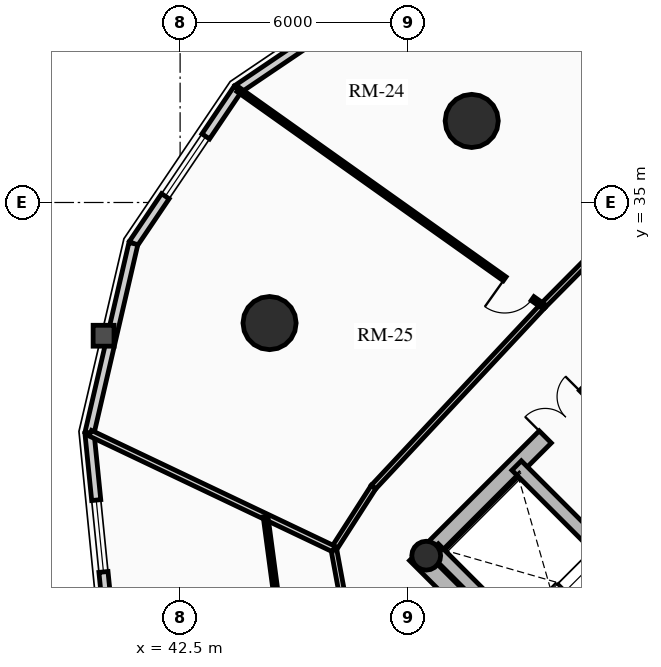
"""IFC4 building model, lengths in metres.
Left out: names, types, materials, properties, quantities, classifications, styles, units other than length and angle.
Written with IfcOpenShell. Run it as: python <this file> out.ifc"""

import sys

from ifc_helpers import new_model, si_unit, direction, frame, frame_2d, origin, origin_2d, place, context, subcontext, project, spatial, rectangle, circle, hollow_circle, extrude, source, transform, mapped, element, fill, save


model = new_model("IFC4")
c1 = context("Model", 3, precision=1e-05, world=origin(), true_north=direction((0.0, 1.0)))
c2 = subcontext(c1, "Body", "Model", "MODEL_VIEW")
j1 = project(units=[si_unit("LENGTHUNIT", "METRE"), si_unit("PLANEANGLEUNIT", "RADIAN")], contexts=[c1])
p1 = place(None, origin())
s1 = spatial("IfcSite", under=j1, at=p1, CompositionType="ELEMENT")
p2 = place(p1, origin())
s2 = spatial("IfcBuilding", under=s1, at=p2, CompositionType="ELEMENT")
p3 = place(p2, frame((0.0, 0.0, 113.8)))
s3 = spatial("IfcBuildingStorey", under=s2, at=p3, CompositionType="ELEMENT", Elevation=113.8)
p4 = place(p3, frame((58.737, 15.697, 0.0), z_axis=(0.0, 0.0, 1.0), x_axis=(-0.707106781187, 0.707106781187, 0.0)))
e1 = element("IfcWall", 1, at=p4, inside=s3, PredefinedType="SHEAR", context=c2, shape_type="SweptSolid", body=[
    extrude(rectangle(XDim=14.2, YDim=0.45, at=frame_2d((7.1, 0.0))), origin(), (0.0, 0.0, 1.0), 2.91),
])
p5 = place(p3, frame((48.856, 25.578, 0.0), z_axis=(0.0, 0.0, 1.0), x_axis=(0.707106781187, 0.707106781187, 0.0)))
e2 = element("IfcWall", 2, at=p5, inside=s3, PredefinedType="SHEAR", context=c2, shape_type="SweptSolid", body=[
    extrude(rectangle(XDim=10.7, YDim=0.45, at=frame_2d((5.35, 0.0))), origin(), (0.0, 0.0, 1.0), 2.91),
])
m1 = source(origin(), c2, "Body", "SweptSolid", [
    extrude(rectangle(XDim=1.5, YDim=2.02, at=frame_2d((0.75, 1.01))), frame((0.0, 0.235, 0.0), z_axis=(0.0, -1.0, 0.0), x_axis=(1.0, 0.0, 0.0)), (0.0, 0.0, 1.0), 0.47),
])
p6 = place(p5, frame((4.6, 0.0, 0.0)))
e3 = element("IfcOpeningElement", 3, at=p6, cuts=e2, PredefinedType="OPENING", context=c2, shape_type="MappedRepresentation", body=[
    mapped(m1, transform((0.0, 0.0, 0.0), x_axis=(1.0, 0.0, 0.0), y_axis=(0.0, 1.0, 0.0), z_axis=(0.0, 0.0, 1.0), scale=1.0)),
])
p7 = place(p3, frame((61.078, 18.355, 0.0), z_axis=(0.0, 0.0, 1.0), x_axis=(-0.707106781187, 0.707106781187, 0.0)))
e4 = element("IfcWall", 4, at=p7, inside=s3, PredefinedType="SHEAR", context=c2, shape_type="SweptSolid", body=[
    extrude(rectangle(XDim=13.75, YDim=0.35, at=frame_2d((6.875, 0.0))), origin(), (0.0, 0.0, 1.0), 2.91),
])
m2 = source(origin(), c2, "Body", "SweptSolid", [
    extrude(rectangle(XDim=1.1, YDim=2.015, at=frame_2d((0.55, 1.007))), frame((0.0, 0.185, 0.0), z_axis=(0.0, -1.0, 0.0), x_axis=(1.0, 0.0, 0.0)), (0.0, 0.0, 1.0), 0.37),
])
p8 = place(p7, frame((4.875, 0.0, 0.0)))
e5 = element("IfcOpeningElement", 5, at=p8, cuts=e4, PredefinedType="OPENING", context=c2, shape_type="MappedRepresentation", body=[
    mapped(m2, transform((0.0, 0.0, 0.0), x_axis=(1.0, 0.0, 0.0), y_axis=(0.0, 1.0, 0.0), z_axis=(0.0, 0.0, 1.0), scale=1.0)),
])
m3 = source(origin(), c2, "Body", "SweptSolid", [
    extrude(rectangle(XDim=1.15, YDim=2.02, at=frame_2d((0.575, 1.01))), frame((0.0, 0.185, 0.0), z_axis=(0.0, -1.0, 0.0), x_axis=(1.0, 0.0, 0.0)), (0.0, 0.0, 1.0), 0.37),
])
p9 = place(p7, frame((7.295, 0.0, 0.0)))
e6 = element("IfcOpeningElement", 6, at=p9, cuts=e4, PredefinedType="OPENING", context=c2, shape_type="MappedRepresentation", body=[
    mapped(m3, transform((0.0, 0.0, 0.0), x_axis=(1.0, 0.0, 0.0), y_axis=(0.0, 1.0, 0.0), z_axis=(0.0, 0.0, 1.0), scale=1.0)),
])
p10 = place(p3, frame((53.922, 21.141, 0.0), z_axis=(0.0, 0.0, 1.0), x_axis=(-0.707088616009, 0.707124945897, 0.0)))
e7 = element("IfcWall", 7, at=p10, inside=s3, PredefinedType="SHEAR", context=c2, shape_type="SweptSolid", body=[
    extrude(rectangle(XDim=6.72, YDim=0.35, at=frame_2d((3.36, 0.0))), origin(), (0.0, 0.0, 1.0), 2.91),
])
p11 = place(p3, frame((48.976, 25.706, 0.0), z_axis=(0.0, 0.0, 1.0), x_axis=(0.707106781187, 0.707106781187, 0.0)))
e8 = element("IfcColumn", 8, at=p11, inside=s3, PredefinedType="COLUMN", context=c2, shape_type="SweptSolid", body=[
    extrude(hollow_circle(Radius=0.38, WallThickness=0.032, at=origin_2d()), origin(), (0.0, 0.0, 1.0), 2.91),
])
for number, where, z_axis, x_axis in (
    (9, (50.173, 37.146, 0.0), (0.0, 0.0, 1.0), (1.0, 0.0, 0.0)),
    (10, (44.854, 31.827, 0.0), (0.0, 0.0, 1.0), (1.0, 0.0, 0.0)),
):
    element("IfcColumn", number, at=place(p3, frame(where, z_axis=z_axis, x_axis=x_axis)), inside=s3, PredefinedType="USERDEFINED", context=c2, shape_type="SweptSolid", body=[
        extrude(circle(Radius=0.7, at=origin_2d()), origin(), (0.0, 0.0, 1.0), 2.91),
    ])
p12 = place(p3, frame((44.015, 37.985, 0.0), z_axis=(0.0, 0.0, 1.0), x_axis=(0.828781148131, 0.559572880421, 0.0)))
e11 = element("IfcWall", 11, at=p12, inside=s3, PredefinedType="SOLIDWALL", context=c2, shape_type="SweptSolid", body=[
    extrude(rectangle(XDim=4.905, YDim=0.24, at=frame_2d((2.452, 0.0))), origin(), (0.0, 0.0, 1.0), 2.179),
])
p13 = place(p3, frame((41.271, 33.92, 0.0), z_axis=(0.0, 0.0, 1.0), x_axis=(0.559572880421, 0.828781148131, 0.0)))
e12 = element("IfcWall", 12, at=p13, inside=s3, PredefinedType="SOLIDWALL", context=c2, shape_type="SweptSolid", body=[
    extrude(rectangle(XDim=4.905, YDim=0.24, at=frame_2d((2.452, 0.0))), origin(), (0.0, 0.0, 1.0), 2.179),
])
m4 = source(origin(), c2, "Body", "SweptSolid", [
    extrude(rectangle(XDim=1.9, YDim=1.35, at=frame_2d((0.95, 0.675))), frame((0.0, 0.13, 0.0), z_axis=(0.0, -1.0, 0.0), x_axis=(1.0, 0.0, 0.0)), (0.0, 0.0, 1.0), 0.26),
])
p14 = place(p13, frame((1.502, 0.0, 0.65)))
e13 = element("IfcOpeningElement", 13, at=p14, cuts=e12, PredefinedType="OPENING", context=c2, shape_type="MappedRepresentation", body=[
    mapped(m4, transform((0.0, 0.0, 0.0), x_axis=(1.0, 0.0, 0.0), y_axis=(0.0, 1.0, 0.0), z_axis=(0.0, 0.0, 1.0), scale=1.0)),
])
p15 = place(p3, frame((40.115, 28.933, 0.0), z_axis=(0.0, 0.0, 1.0), x_axis=(0.225834725257, 0.974165631126, 0.0)))
e14 = element("IfcWall", 14, at=p15, inside=s3, PredefinedType="SOLIDWALL", context=c2, shape_type="SweptSolid", body=[
    extrude(rectangle(XDim=5.119, YDim=0.24, at=frame_2d((2.56, 0.0))), origin(), (0.0, 0.0, 1.0), 2.179),
])
p16 = place(p3, frame((40.661, 23.513, 0.0), z_axis=(0.0, 0.0, 1.0), x_axis=(-0.10015591906, 0.994971754311, 0.0)))
e15 = element("IfcWall", 15, at=p16, inside=s3, PredefinedType="SOLIDWALL", context=c2, shape_type="SweptSolid", body=[
    extrude(rectangle(XDim=5.448, YDim=0.24, at=frame_2d((2.724, 0.0))), origin(), (0.0, 0.0, 1.0), 2.179),
])
p17 = place(p16, frame((1.774, 0.0, 0.65)))
e16 = element("IfcOpeningElement", 16, at=p17, cuts=e15, PredefinedType="OPENING", context=c2, shape_type="MappedRepresentation", body=[
    mapped(m4, transform((0.0, 0.0, 0.0), x_axis=(1.0, 0.0, 0.0), y_axis=(0.0, 1.0, 0.0), z_axis=(0.0, 0.0, 1.0), scale=1.0)),
])
p18 = place(p3, frame((54.427, 34.683, 0.0), z_axis=(0.0, 0.0, 1.0), x_axis=(-0.704178989986, -0.710022499687, 0.0)))
e17 = element("IfcWall", 17, at=p18, inside=s3, PredefinedType="PARTITIONING", context=c2, shape_type="SweptSolid", body=[
    extrude(rectangle(XDim=3.384, YDim=0.15, at=frame_2d((1.692, 0.0))), origin(), (0.0, 0.0, 1.0), 2.225),
])
p19 = place(p3, frame((52.043, 32.28, 0.0), z_axis=(0.0, 0.0, 1.0), x_axis=(-0.682606081633, -0.730786519661, 0.0)))
e18 = element("IfcWall", 18, at=p19, inside=s3, PredefinedType="PARTITIONING", context=c2, shape_type="SweptSolid", body=[
    extrude(rectangle(XDim=6.527, YDim=0.15, at=frame_2d((3.263, 0.0))), origin(), (0.0, 0.0, 1.0), 2.225),
])
p20 = place(p3, frame((47.588, 27.51, 0.0), z_axis=(0.0, 0.0, 1.0), x_axis=(-0.540202619347, -0.841534984449, 0.0)))
e19 = element("IfcWall", 19, at=p20, inside=s3, PredefinedType="PARTITIONING", context=c2, shape_type="SweptSolid", body=[
    extrude(rectangle(XDim=1.935, YDim=0.15, at=frame_2d((0.967, 0.0))), origin(), (0.0, 0.0, 1.0), 2.225),
])
p21 = place(p3, frame((46.543, 25.882, 0.0), z_axis=(0.0, 0.0, 1.0), x_axis=(0.181153502579, -0.983454832976, 0.0)))
e20 = element("IfcWall", 20, at=p21, inside=s3, PredefinedType="PARTITIONING", context=c2, shape_type="SweptSolid", body=[
    extrude(rectangle(XDim=1.392, YDim=0.15, at=frame_2d((0.696, 0.0))), origin(), (0.0, 0.0, 1.0), 2.225),
])
p22 = place(p3, frame((55.984, 35.035, 0.0), z_axis=(0.0, 0.0, 1.0), x_axis=(-0.392438685048, 0.919778168081, 0.0)))
e21 = element("IfcWall", 21, at=p22, inside=s3, PredefinedType="PARTITIONING", context=c2, shape_type="SweptSolid", body=[
    extrude(rectangle(XDim=7.426, YDim=0.16, at=frame_2d((3.713, 0.0))), origin(), (0.0, 0.0, 1.0), 2.179),
])
p23 = place(p3, frame((46.543, 25.882, 0.0), z_axis=(0.0, 0.0, 1.0), x_axis=(-0.903054383171, 0.429526228576, 0.0)))
e22 = element("IfcWall", 22, at=p23, inside=s3, PredefinedType="PARTITIONING", context=c2, shape_type="SweptSolid", body=[
    extrude(rectangle(XDim=7.096, YDim=0.16, at=frame_2d((3.548, 0.0))), origin(), (0.0, 0.0, 1.0), 2.179),
])
p24 = place(p3, frame((52.043, 32.28, 0.0), z_axis=(0.0, 0.0, 1.0), x_axis=(-0.81534487613, 0.578975589268, 0.0)))
e23 = element("IfcWall", 23, at=p24, inside=s3, PredefinedType="PARTITIONING", context=c2, shape_type="SweptSolid", body=[
    extrude(rectangle(XDim=9.829, YDim=0.125, at=frame_2d((4.915, 0.0))), origin(), (0.0, 0.0, 1.0), 2.179),
])
m5 = source(origin(), c2, "Body", "SweptSolid", [
    extrude(rectangle(XDim=0.9, YDim=2.005, at=frame_2d((0.45, 1.002))), frame((0.0, 0.073, 0.0), z_axis=(0.0, -1.0, 0.0), x_axis=(1.0, 0.0, 0.0)), (0.0, 0.0, 1.0), 0.145),
])
p25 = place(p24, frame((0.33, 0.0, 0.0)))
e24 = element("IfcOpeningElement", 24, at=p25, cuts=e23, PredefinedType="OPENING", context=c2, shape_type="MappedRepresentation", body=[
    mapped(m5, transform((0.0, 0.0, 0.0), x_axis=(1.0, 0.0, 0.0), y_axis=(0.0, 1.0, 0.0), z_axis=(0.0, 0.0, 1.0), scale=1.0)),
])
p26 = place(p3, frame((44.749, 26.736, 0.0), z_axis=(0.0, 0.0, 1.0), x_axis=(0.132518524874, -0.991180528746, 0.0)))
e25 = element("IfcWall", 25, at=p26, inside=s3, PredefinedType="PARTITIONING", context=c2, shape_type="SweptSolid", body=[
    extrude(rectangle(XDim=2.524, YDim=0.125, at=frame_2d((1.262, 0.0))), origin(), (0.0, 0.0, 1.0), 2.179),
])
m6 = source(origin(), c2, "Body", "SweptSolid", [
    extrude(rectangle(XDim=1.9, YDim=1.35, at=frame_2d((0.95, 0.675))), frame((0.0, 0.03, 0.0), z_axis=(0.0, -1.0, 0.0), x_axis=(1.0, 0.0, 0.0)), (0.0, 0.0, 1.0), 0.06),
])
p27 = place(p14, origin())
e26 = element("IfcWindow", 26, at=p27, inside=s3, PartitioningType="DOUBLE_PANEL_VERTICAL", PredefinedType="WINDOW", context=c2, shape_type="MappedRepresentation", body=[
    mapped(m6, transform((0.0, 0.0, 0.0), x_axis=(1.0, 0.0, 0.0), y_axis=(0.0, 1.0, 0.0), z_axis=(0.0, 0.0, 1.0), scale=1.0)),
])
fill(e13, e26)
p28 = place(p17, origin())
e27 = element("IfcWindow", 27, at=p28, inside=s3, PartitioningType="DOUBLE_PANEL_VERTICAL", PredefinedType="WINDOW", context=c2, shape_type="MappedRepresentation", body=[
    mapped(m6, transform((0.0, 0.0, 0.0), x_axis=(1.0, 0.0, 0.0), y_axis=(0.0, 1.0, 0.0), z_axis=(0.0, 0.0, 1.0), scale=1.0)),
])
fill(e16, e27)
m7 = source(origin(), c2, "Body", "SweptSolid", [
    extrude(rectangle(XDim=1.5, YDim=2.02, at=frame_2d((0.75, 1.01))), frame((0.0, 0.025, 0.0), z_axis=(0.0, -1.0, 0.0), x_axis=(1.0, 0.0, 0.0)), (0.0, 0.0, 1.0), 0.05),
])
p29 = place(p6, origin())
e28 = element("IfcDoor", 28, at=p29, inside=s3, OperationType="DOUBLE_DOOR_SINGLE_SWING", PredefinedType="DOOR", context=c2, shape_type="MappedRepresentation", body=[
    mapped(m7, transform((0.0, 0.0, 0.0), x_axis=(1.0, 0.0, 0.0), y_axis=(0.0, 1.0, 0.0), z_axis=(0.0, 0.0, 1.0), scale=1.0)),
])
fill(e3, e28)
m8 = source(origin(), c2, "Body", "SweptSolid", [
    extrude(rectangle(XDim=0.9, YDim=2.005, at=frame_2d((0.45, 1.002))), frame((0.0, 0.025, 0.0), z_axis=(0.0, -1.0, 0.0), x_axis=(1.0, 0.0, 0.0)), (0.0, 0.0, 1.0), 0.05),
])
p30 = place(p25, origin())
e29 = element("IfcDoor", 29, at=p30, inside=s3, OperationType="SINGLE_SWING_RIGHT", PredefinedType="DOOR", context=c2, shape_type="MappedRepresentation", body=[
    mapped(m8, transform((0.0, 0.0, 0.0), x_axis=(1.0, 0.0, 0.0), y_axis=(0.0, 1.0, 0.0), z_axis=(0.0, 0.0, 1.0), scale=1.0)),
])
fill(e24, e29)
save(model, sys.argv[1])
